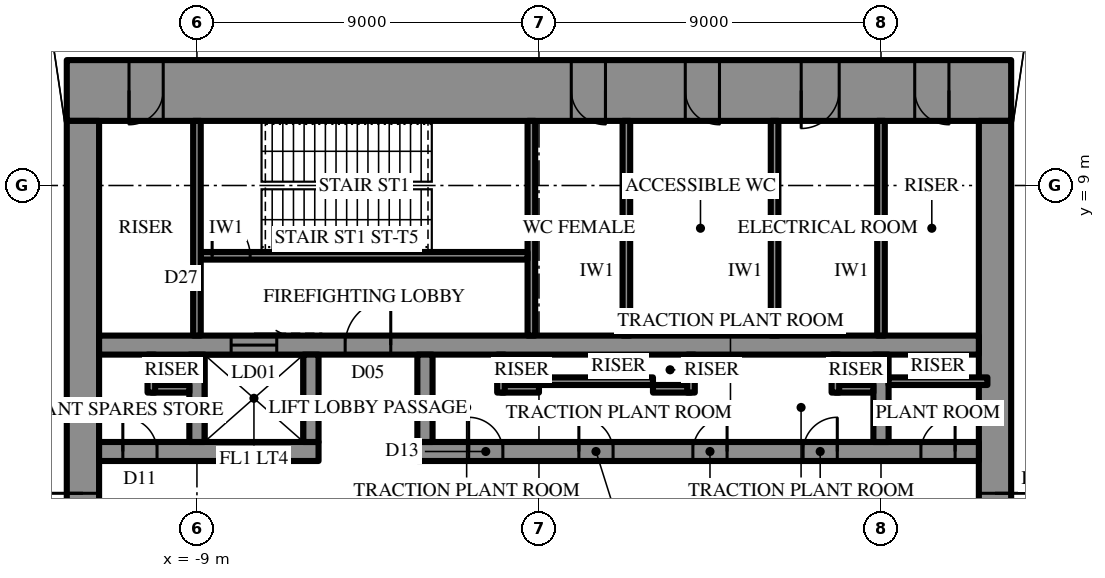
"""IFC4 building model, lengths in metres.
Left out: names, types, materials, properties, quantities, classifications, styles, units other than length and angle.
Written with IfcOpenShell. Run it as: python <this file> out.ifc"""

import sys

from ifc_helpers import new_model, si_unit, direction, frame, frame_2d, origin, place, context, subcontext, project, spatial, rectangle, extrude, element, fill, save


model = new_model("IFC4")
c1 = context("Model", 3, precision=1e-05, world=origin(), true_north=direction((0.0, 1.0)))
c2 = subcontext(c1, "Body", "Model", "MODEL_VIEW")
j1 = project(units=[si_unit("LENGTHUNIT", "METRE"), si_unit("PLANEANGLEUNIT", "RADIAN")], contexts=[c1])
p1 = place(None, origin())
s1 = spatial("IfcSite", under=j1, at=p1, CompositionType="ELEMENT")
p2 = place(p1, origin())
s2 = spatial("IfcBuilding", under=s1, at=p2, CompositionType="ELEMENT")
p3 = place(p2, frame((0.0, 0.0, 396.3)))
s3 = spatial("IfcBuildingStorey", under=s2, at=p3, CompositionType="ELEMENT", Elevation=396.3)
p4 = place(p3, frame((-12.425, 11.5, 0.0), z_axis=(0.0, 0.0, 1.0), x_axis=(1.0, 0.0, 0.0)))
e1 = element("IfcWall", 1, at=p4, inside=s3, PredefinedType="SHEAR", context=c2, shape_type="SweptSolid", body=[
    extrude(rectangle(XDim=24.85, YDim=1.6, at=frame_2d((12.425, 0.0))), origin(), (0.0, 0.0, 1.0), 6.0),
])
p5 = place(p4, frame((13.275, 0.0, 0.0)))
e2 = element("IfcOpeningElement", 2, at=p5, cuts=e1, PredefinedType="OPENING", context=c2, shape_type="SweptSolid", body=[
    extrude(rectangle(XDim=0.9, YDim=2.2, at=frame_2d((0.45, 1.1))), frame((0.0, 0.81, 0.0), z_axis=(0.0, -1.0, 0.0), x_axis=(1.0, 0.0, 0.0)), (0.0, 0.0, 1.0), 1.62),
])
p6 = place(p4, frame((16.275, 0.0, 0.0)))
e3 = element("IfcOpeningElement", 3, at=p6, cuts=e1, PredefinedType="OPENING", context=c2, shape_type="SweptSolid", body=[
    extrude(rectangle(XDim=0.9, YDim=2.2, at=frame_2d((0.45, 1.1))), frame((0.0, 0.81, 0.0), z_axis=(0.0, -1.0, 0.0), x_axis=(1.0, 0.0, 0.0)), (0.0, 0.0, 1.0), 1.62),
])
p7 = place(p4, frame((19.325, 0.0, 0.0)))
e4 = element("IfcOpeningElement", 4, at=p7, cuts=e1, PredefinedType="OPENING", context=c2, shape_type="SweptSolid", body=[
    extrude(rectangle(XDim=1.0, YDim=2.2, at=frame_2d((0.5, 1.1))), frame((0.0, 0.81, 0.0), z_axis=(0.0, -1.0, 0.0), x_axis=(1.0, 0.0, 0.0)), (0.0, 0.0, 1.0), 1.62),
])
p8 = place(p4, frame((1.637, 0.0, 0.0)))
e5 = element("IfcOpeningElement", 5, at=p8, cuts=e1, PredefinedType="OPENING", context=c2, shape_type="SweptSolid", body=[
    extrude(rectangle(XDim=0.9, YDim=2.2, at=frame_2d((0.45, 1.1))), frame((0.0, 0.81, 0.0), z_axis=(0.0, -1.0, 0.0), x_axis=(1.0, 0.0, 0.0)), (0.0, 0.0, 1.0), 1.62),
])
p9 = place(p4, frame((22.312, 0.0, 0.0)))
e6 = element("IfcOpeningElement", 6, at=p9, cuts=e1, PredefinedType="OPENING", context=c2, shape_type="SweptSolid", body=[
    extrude(rectangle(XDim=0.9, YDim=2.2, at=frame_2d((0.45, 1.1))), frame((0.0, 0.81, 0.0), z_axis=(0.0, -1.0, 0.0), x_axis=(1.0, 0.0, 0.0)), (0.0, 0.0, 1.0), 1.62),
])
p10 = place(p3, frame((12.0, -10.7, 0.0), z_axis=(0.0, 0.0, 1.0), x_axis=(0.0, 1.0, 0.0)))
e7 = element("IfcWall", 7, at=p10, inside=s3, PredefinedType="SHEAR", context=c2, shape_type="SweptSolid", body=[
    extrude(rectangle(XDim=21.4, YDim=0.85, at=frame_2d((10.7, 0.0))), origin(), (0.0, 0.0, 1.0), 6.0),
])
p11 = place(p10, frame((9.8, 0.0, 0.0)))
e8 = element("IfcOpeningElement", 8, at=p11, cuts=e7, PredefinedType="OPENING", context=c2, shape_type="SweptSolid", body=[
    extrude(rectangle(XDim=1.8, YDim=2.4, at=frame_2d((0.9, 1.2))), frame((0.0, 0.435, 0.0), z_axis=(0.0, -1.0, 0.0), x_axis=(1.0, 0.0, 0.0)), (0.0, 0.0, 1.0), 0.87),
])
p12 = place(p3, frame((-12.0, 10.7, 0.0), z_axis=(0.0, 0.0, 1.0), x_axis=(0.0, -1.0, 0.0)))
e9 = element("IfcWall", 9, at=p12, inside=s3, PredefinedType="SHEAR", context=c2, shape_type="SweptSolid", body=[
    extrude(rectangle(XDim=21.4, YDim=0.85, at=frame_2d((10.7, 0.0))), origin(), (0.0, 0.0, 1.0), 6.0),
])
p13 = place(p12, frame((9.8, 0.0, 0.0)))
e10 = element("IfcOpeningElement", 10, at=p13, cuts=e9, PredefinedType="OPENING", context=c2, shape_type="SweptSolid", body=[
    extrude(rectangle(XDim=1.8, YDim=2.4, at=frame_2d((0.9, 1.2))), frame((0.0, 0.435, 0.0), z_axis=(0.0, -1.0, 0.0), x_axis=(1.0, 0.0, 0.0)), (0.0, 0.0, 1.0), 0.87),
])
p14 = place(p3, frame((-11.575, 2.0, 0.0), z_axis=(0.0, 0.0, 1.0), x_axis=(1.0, 0.0, 0.0)))
e11 = element("IfcWall", 11, at=p14, inside=s3, PredefinedType="SHEAR", context=c2, shape_type="SweptSolid", body=[
    extrude(rectangle(XDim=5.775, YDim=0.5, at=frame_2d((2.887, 0.0))), origin(), (0.0, 0.0, 1.0), 6.0),
])
p15 = place(p14, frame((0.625, 0.0, 0.0)))
e12 = element("IfcOpeningElement", 12, at=p15, cuts=e11, PredefinedType="OPENING", context=c2, shape_type="SweptSolid", body=[
    extrude(rectangle(XDim=0.9, YDim=2.2, at=frame_2d((0.45, 1.1))), frame((0.0, 0.26, 0.0), z_axis=(0.0, -1.0, 0.0), x_axis=(1.0, 0.0, 0.0)), (0.0, 0.0, 1.0), 0.52),
])
p16 = place(p3, frame((-3.2, 2.0, 0.0), z_axis=(0.0, 0.0, 1.0), x_axis=(1.0, 0.0, 0.0)))
e13 = element("IfcWall", 13, at=p16, inside=s3, PredefinedType="SHEAR", context=c2, shape_type="SweptSolid", body=[
    extrude(rectangle(XDim=14.775, YDim=0.5, at=frame_2d((7.387, 0.0))), origin(), (0.0, 0.0, 1.0), 6.0),
])
p17 = place(p16, frame((1.35, 0.0, 0.0)))
e14 = element("IfcOpeningElement", 14, at=p17, cuts=e13, PredefinedType="OPENING", context=c2, shape_type="SweptSolid", body=[
    extrude(rectangle(XDim=0.9, YDim=2.2, at=frame_2d((0.45, 1.1))), frame((0.0, 0.26, 0.0), z_axis=(0.0, -1.0, 0.0), x_axis=(1.0, 0.0, 0.0)), (0.0, 0.0, 1.0), 0.52),
])
p18 = place(p16, frame((4.25, 0.0, 0.0)))
e15 = element("IfcOpeningElement", 15, at=p18, cuts=e13, PredefinedType="OPENING", context=c2, shape_type="SweptSolid", body=[
    extrude(rectangle(XDim=0.9, YDim=2.2, at=frame_2d((0.45, 1.1))), frame((0.0, 0.26, 0.0), z_axis=(0.0, -1.0, 0.0), x_axis=(1.0, 0.0, 0.0)), (0.0, 0.0, 1.0), 0.52),
])
p19 = place(p16, frame((7.25, 0.0, 0.0)))
e16 = element("IfcOpeningElement", 16, at=p19, cuts=e13, PredefinedType="OPENING", context=c2, shape_type="SweptSolid", body=[
    extrude(rectangle(XDim=0.9, YDim=2.2, at=frame_2d((0.45, 1.1))), frame((0.0, 0.26, 0.0), z_axis=(0.0, -1.0, 0.0), x_axis=(1.0, 0.0, 0.0)), (0.0, 0.0, 1.0), 0.52),
])
p20 = place(p16, frame((10.15, 0.0, 0.0)))
e17 = element("IfcOpeningElement", 17, at=p20, cuts=e13, PredefinedType="OPENING", context=c2, shape_type="SweptSolid", body=[
    extrude(rectangle(XDim=0.9, YDim=2.2, at=frame_2d((0.45, 1.1))), frame((0.0, 0.26, 0.0), z_axis=(0.0, -1.0, 0.0), x_axis=(1.0, 0.0, 0.0)), (0.0, 0.0, 1.0), 0.52),
])
p21 = place(p16, frame((13.25, 0.0, 0.0)))
e18 = element("IfcOpeningElement", 18, at=p21, cuts=e13, PredefinedType="OPENING", context=c2, shape_type="SweptSolid", body=[
    extrude(rectangle(XDim=0.9, YDim=2.2, at=frame_2d((0.45, 1.1))), frame((0.0, 0.26, 0.0), z_axis=(0.0, -1.0, 0.0), x_axis=(1.0, 0.0, 0.0)), (0.0, 0.0, 1.0), 0.52),
])
p22 = place(p3, frame((-11.575, 4.8, 0.0), z_axis=(0.0, 0.0, 1.0), x_axis=(1.0, 0.0, 0.0)))
e19 = element("IfcWall", 19, at=p22, inside=s3, PredefinedType="SHEAR", context=c2, shape_type="SweptSolid", body=[
    extrude(rectangle(XDim=23.15, YDim=0.5, at=frame_2d((11.575, 0.0))), origin(), (0.0, 0.0, 1.0), 6.0),
])
p23 = place(p22, frame((6.475, 0.0, 0.0)))
e20 = element("IfcOpeningElement", 20, at=p23, cuts=e19, PredefinedType="OPENING", context=c2, shape_type="SweptSolid", body=[
    extrude(rectangle(XDim=1.2, YDim=2.2, at=frame_2d((0.6, 1.1))), frame((0.0, 0.26, 0.0), z_axis=(0.0, -1.0, 0.0), x_axis=(1.0, 0.0, 0.0)), (0.0, 0.0, 1.0), 0.52),
])
p24 = place(p22, frame((3.475, 0.0, 0.0)))
e21 = element("IfcOpeningElement", 21, at=p24, cuts=e19, PredefinedType="OPENING", context=c2, shape_type="SweptSolid", body=[
    extrude(rectangle(XDim=1.2, YDim=2.2, at=frame_2d((0.6, 1.1))), frame((0.0, 0.26, 0.0), z_axis=(0.0, -1.0, 0.0), x_axis=(1.0, 0.0, 0.0)), (0.0, 0.0, 1.0), 0.52),
])
for number, where, z_axis, x_axis in (
    (22, (-9.0, 2.25, 0.0), (0.0, 0.0, 1.0), (0.0, 1.0, 0.0)),
    (23, (-6.0, 2.25, 0.0), (0.0, 0.0, 1.0), (0.0, 1.0, 0.0)),
    (24, (-3.0, 2.25, 0.0), (0.0, 0.0, 1.0), (0.0, 1.0, 0.0)),
    (25, (9.0, 2.25, 0.0), (0.0, 0.0, 1.0), (0.0, 1.0, 0.0)),
):
    element("IfcWall", number, at=place(p3, frame(where, z_axis=z_axis, x_axis=x_axis)), inside=s3, PredefinedType="SHEAR", context=c2, shape_type="SweptSolid", body=[
        extrude(rectangle(XDim=2.3, YDim=0.4, at=frame_2d((1.15, 0.0))), origin(), (0.0, 0.0, 1.0), 6.0),
    ])
p25 = place(p3, frame((-0.2, 5.05, 0.0), z_axis=(0.0, 0.0, 1.0), x_axis=(0.0, 1.0, 0.0)))
e26 = element("IfcWall", 26, at=p25, inside=s3, PredefinedType="SHEAR", context=c2, shape_type="SweptSolid", body=[
    extrude(rectangle(XDim=5.65, YDim=0.2, at=frame_2d((2.825, 0.0))), origin(), (0.0, 0.0, 1.0), 6.0),
])
p26 = place(p3, frame((-8.9, 7.15, 0.0), z_axis=(0.0, 0.0, 1.0), x_axis=(1.0, 0.0, 0.0)))
e27 = element("IfcWall", 27, at=p26, inside=s3, PredefinedType="SHEAR", context=c2, shape_type="SweptSolid", body=[
    extrude(rectangle(XDim=8.6, YDim=0.2, at=frame_2d((4.3, 0.0))), origin(), (0.0, 0.0, 1.0), 6.0),
])
p27 = place(p26, frame((0.3, 0.0, 0.0)))
e28 = element("IfcOpeningElement", 28, at=p27, cuts=e27, PredefinedType="OPENING", context=c2, shape_type="SweptSolid", body=[
    extrude(rectangle(XDim=1.0, YDim=2.2, at=frame_2d((0.5, 1.1))), frame((0.0, 0.11, 0.0), z_axis=(0.0, -1.0, 0.0), x_axis=(1.0, 0.0, 0.0)), (0.0, 0.0, 1.0), 0.22),
])
for number, where, z_axis, x_axis in (
    (29, (-9.0, 5.05, 0.0), (0.0, 0.0, 1.0), (0.0, 1.0, 0.0)),
    (30, (9.0, 5.05, 0.0), (0.0, 0.0, 1.0), (0.0, 1.0, 0.0)),
    (31, (2.3, 5.05, 0.0), (0.0, 0.0, 1.0), (0.0, 1.0, 0.0)),
    (32, (6.2, 5.05, 0.0), (0.0, 0.0, 1.0), (0.0, 1.0, 0.0)),
):
    element("IfcWall", number, at=place(p3, frame(where, z_axis=z_axis, x_axis=x_axis)), inside=s3, PredefinedType="PARTITIONING", context=c2, shape_type="SweptSolid", body=[
        extrude(rectangle(XDim=5.65, YDim=0.2, at=frame_2d((2.825, 0.0))), origin(), (0.0, 0.0, 1.0), 5.8),
    ])
for number, where, z_axis, x_axis in (
    (33, (-10.2, 3.65, 0.0), (0.0, 0.0, 1.0), (1.0, 0.0, 0.0)),
    (34, (-10.2, 3.55, 0.0), (0.0, 0.0, 1.0), (0.0, 1.0, 0.0)),
    (35, (-1.0, 3.65, 0.0), (0.0, 0.0, 1.0), (1.0, 0.0, 0.0)),
    (36, (-1.0, 3.55, 0.0), (0.0, 0.0, 1.0), (0.0, 1.0, 0.0)),
):
    element("IfcWall", number, at=place(p3, frame(where, z_axis=z_axis, x_axis=x_axis)), inside=s3, PredefinedType="PARTITIONING", context=c2, shape_type="SweptSolid", body=[
        extrude(rectangle(XDim=1.0, YDim=0.2, at=frame_2d((0.5, 0.0))), origin(), (0.0, 0.0, 1.0), 5.8),
    ])
p28 = place(p3, frame((0.0, 3.85, 0.0), z_axis=(0.0, 0.0, 1.0), x_axis=(1.0, 0.0, 0.0)))
e37 = element("IfcWall", 37, at=p28, inside=s3, PredefinedType="PARTITIONING", context=c2, shape_type="SweptSolid", body=[
    extrude(rectangle(XDim=3.0, YDim=0.2, at=frame_2d((1.5, 0.0))), origin(), (0.0, 0.0, 1.0), 5.8),
])
for number, where, z_axis, x_axis in (
    (38, (3.0, 3.65, 0.0), (0.0, 0.0, 1.0), (1.0, 0.0, 0.0)),
    (39, (4.0, 3.55, 0.0), (0.0, 0.0, 1.0), (0.0, 1.0, 0.0)),
    (40, (7.8, 3.65, 0.0), (0.0, 0.0, 1.0), (1.0, 0.0, 0.0)),
    (41, (7.8, 3.55, 0.0), (0.0, 0.0, 1.0), (0.0, 1.0, 0.0)),
):
    element("IfcWall", number, at=place(p3, frame(where, z_axis=z_axis, x_axis=x_axis)), inside=s3, PredefinedType="PARTITIONING", context=c2, shape_type="SweptSolid", body=[
        extrude(rectangle(XDim=1.0, YDim=0.2, at=frame_2d((0.5, 0.0))), origin(), (0.0, 0.0, 1.0), 5.8),
    ])
p29 = place(p3, frame((9.2, 3.85, 0.0), z_axis=(0.0, 0.0, 1.0), x_axis=(1.0, 0.0, 0.0)))
e42 = element("IfcWall", 42, at=p29, inside=s3, PredefinedType="PARTITIONING", context=c2, shape_type="SweptSolid", body=[
    extrude(rectangle(XDim=2.6, YDim=0.2, at=frame_2d((1.3, 0.0))), origin(), (0.0, 0.0, 1.0), 5.8),
])
p30 = place(p11, frame((1.8, 0.0, 0.0), z_axis=(0.0, 0.0, 1.0), x_axis=(-1.0, 0.0, 0.0)))
e43 = element("IfcDoor", 43, at=p30, inside=s3, OperationType="DOUBLE_DOOR_SINGLE_SWING", PredefinedType="DOOR", context=c2, shape_type="SweptSolid", body=[
    extrude(rectangle(XDim=1.8, YDim=2.4, at=frame_2d((0.9, 1.2))), frame((0.0, 0.025, 0.0), z_axis=(0.0, -1.0, 0.0), x_axis=(1.0, 0.0, 0.0)), (0.0, 0.0, 1.0), 0.05),
])
fill(e8, e43)
p31 = place(p13, frame((1.8, 0.0, 0.0), z_axis=(0.0, 0.0, 1.0), x_axis=(-1.0, 0.0, 0.0)))
e44 = element("IfcDoor", 44, at=p31, inside=s3, OperationType="DOUBLE_DOOR_SINGLE_SWING", PredefinedType="DOOR", context=c2, shape_type="SweptSolid", body=[
    extrude(rectangle(XDim=1.8, YDim=2.4, at=frame_2d((0.9, 1.2))), frame((0.0, 0.025, 0.0), z_axis=(0.0, -1.0, 0.0), x_axis=(1.0, 0.0, 0.0)), (0.0, 0.0, 1.0), 0.05),
])
fill(e10, e44)
p32 = place(p23, origin())
e45 = element("IfcDoor", 45, at=p32, inside=s3, OperationType="SINGLE_SWING_LEFT", PredefinedType="DOOR", context=c2, shape_type="SweptSolid", body=[
    extrude(rectangle(XDim=1.2, YDim=2.2, at=frame_2d((0.6, 1.1))), frame((0.0, 0.025, 0.0), z_axis=(0.0, -1.0, 0.0), x_axis=(1.0, 0.0, 0.0)), (0.0, 0.0, 1.0), 0.05),
])
fill(e20, e45)
p33 = place(p27, origin())
e46 = element("IfcDoor", 46, at=p33, inside=s3, OperationType="SINGLE_SWING_RIGHT", PredefinedType="DOOR", context=c2, shape_type="SweptSolid", body=[
    extrude(rectangle(XDim=1.0, YDim=2.2, at=frame_2d((0.5, 1.1))), frame((0.0, 0.025, 0.0), z_axis=(0.0, -1.0, 0.0), x_axis=(1.0, 0.0, 0.0)), (0.0, 0.0, 1.0), 0.05),
])
fill(e28, e46)
p34 = place(p5, frame((0.9, 0.0, 0.0), z_axis=(0.0, 0.0, 1.0), x_axis=(-1.0, 0.0, 0.0)))
e47 = element("IfcDoor", 47, at=p34, inside=s3, OperationType="SINGLE_SWING_RIGHT", PredefinedType="DOOR", context=c2, shape_type="SweptSolid", body=[
    extrude(rectangle(XDim=0.9, YDim=2.2, at=frame_2d((0.45, 1.1))), frame((0.0, 0.025, 0.0), z_axis=(0.0, -1.0, 0.0), x_axis=(1.0, 0.0, 0.0)), (0.0, 0.0, 1.0), 0.05),
])
fill(e2, e47)
p35 = place(p6, frame((0.9, 0.0, 0.0), z_axis=(0.0, 0.0, 1.0), x_axis=(-1.0, 0.0, 0.0)))
e48 = element("IfcDoor", 48, at=p35, inside=s3, OperationType="SINGLE_SWING_RIGHT", PredefinedType="DOOR", context=c2, shape_type="SweptSolid", body=[
    extrude(rectangle(XDim=0.9, YDim=2.2, at=frame_2d((0.45, 1.1))), frame((0.0, 0.025, 0.0), z_axis=(0.0, -1.0, 0.0), x_axis=(1.0, 0.0, 0.0)), (0.0, 0.0, 1.0), 0.05),
])
fill(e3, e48)
p36 = place(p7, frame((1.0, 0.0, 0.0), z_axis=(0.0, 0.0, 1.0), x_axis=(-1.0, 0.0, 0.0)))
e49 = element("IfcDoor", 49, at=p36, inside=s3, OperationType="SINGLE_SWING_LEFT", PredefinedType="DOOR", context=c2, shape_type="SweptSolid", body=[
    extrude(rectangle(XDim=1.0, YDim=2.2, at=frame_2d((0.5, 1.1))), frame((0.0, 0.025, 0.0), z_axis=(0.0, -1.0, 0.0), x_axis=(1.0, 0.0, 0.0)), (0.0, 0.0, 1.0), 0.05),
])
fill(e4, e49)
p37 = place(p8, frame((0.9, 0.0, 0.0), z_axis=(0.0, 0.0, 1.0), x_axis=(-1.0, 0.0, 0.0)))
e50 = element("IfcDoor", 50, at=p37, inside=s3, OperationType="SINGLE_SWING_LEFT", PredefinedType="DOOR", context=c2, shape_type="SweptSolid", body=[
    extrude(rectangle(XDim=0.9, YDim=2.2, at=frame_2d((0.45, 1.1))), frame((0.0, 0.025, 0.0), z_axis=(0.0, -1.0, 0.0), x_axis=(1.0, 0.0, 0.0)), (0.0, 0.0, 1.0), 0.05),
])
fill(e5, e50)
p38 = place(p9, frame((0.9, 0.0, 0.0), z_axis=(0.0, 0.0, 1.0), x_axis=(-1.0, 0.0, 0.0)))
e51 = element("IfcDoor", 51, at=p38, inside=s3, OperationType="SINGLE_SWING_RIGHT", PredefinedType="DOOR", context=c2, shape_type="SweptSolid", body=[
    extrude(rectangle(XDim=0.9, YDim=2.2, at=frame_2d((0.45, 1.1))), frame((0.0, 0.025, 0.0), z_axis=(0.0, -1.0, 0.0), x_axis=(1.0, 0.0, 0.0)), (0.0, 0.0, 1.0), 0.05),
])
fill(e6, e51)
p39 = place(p15, origin())
e52 = element("IfcDoor", 52, at=p39, inside=s3, OperationType="SINGLE_SWING_RIGHT", PredefinedType="DOOR", context=c2, shape_type="SweptSolid", body=[
    extrude(rectangle(XDim=0.9, YDim=2.2, at=frame_2d((0.45, 1.1))), frame((0.0, 0.025, 0.0), z_axis=(0.0, -1.0, 0.0), x_axis=(1.0, 0.0, 0.0)), (0.0, 0.0, 1.0), 0.05),
])
fill(e12, e52)
p40 = place(p17, origin())
e53 = element("IfcDoor", 53, at=p40, inside=s3, OperationType="SINGLE_SWING_RIGHT", PredefinedType="DOOR", context=c2, shape_type="SweptSolid", body=[
    extrude(rectangle(XDim=0.9, YDim=2.2, at=frame_2d((0.45, 1.1))), frame((0.0, 0.025, 0.0), z_axis=(0.0, -1.0, 0.0), x_axis=(1.0, 0.0, 0.0)), (0.0, 0.0, 1.0), 0.05),
])
fill(e14, e53)
p41 = place(p18, origin())
e54 = element("IfcDoor", 54, at=p41, inside=s3, OperationType="SINGLE_SWING_RIGHT", PredefinedType="DOOR", context=c2, shape_type="SweptSolid", body=[
    extrude(rectangle(XDim=0.9, YDim=2.2, at=frame_2d((0.45, 1.1))), frame((0.0, 0.025, 0.0), z_axis=(0.0, -1.0, 0.0), x_axis=(1.0, 0.0, 0.0)), (0.0, 0.0, 1.0), 0.05),
])
fill(e15, e54)
p42 = place(p19, origin())
e55 = element("IfcDoor", 55, at=p42, inside=s3, OperationType="SINGLE_SWING_LEFT", PredefinedType="DOOR", context=c2, shape_type="SweptSolid", body=[
    extrude(rectangle(XDim=0.9, YDim=2.2, at=frame_2d((0.45, 1.1))), frame((0.0, 0.025, 0.0), z_axis=(0.0, -1.0, 0.0), x_axis=(1.0, 0.0, 0.0)), (0.0, 0.0, 1.0), 0.05),
])
fill(e16, e55)
p43 = place(p20, origin())
e56 = element("IfcDoor", 56, at=p43, inside=s3, OperationType="SINGLE_SWING_LEFT", PredefinedType="DOOR", context=c2, shape_type="SweptSolid", body=[
    extrude(rectangle(XDim=0.9, YDim=2.2, at=frame_2d((0.45, 1.1))), frame((0.0, 0.025, 0.0), z_axis=(0.0, -1.0, 0.0), x_axis=(1.0, 0.0, 0.0)), (0.0, 0.0, 1.0), 0.05),
])
fill(e17, e56)
p44 = place(p21, origin())
e57 = element("IfcDoor", 57, at=p44, inside=s3, OperationType="SINGLE_SWING_LEFT", PredefinedType="DOOR", context=c2, shape_type="SweptSolid", body=[
    extrude(rectangle(XDim=0.9, YDim=2.2, at=frame_2d((0.45, 1.1))), frame((0.0, 0.025, 0.0), z_axis=(0.0, -1.0, 0.0), x_axis=(1.0, 0.0, 0.0)), (0.0, 0.0, 1.0), 0.05),
])
fill(e18, e57)
p45 = place(p24, origin())
e58 = element("IfcDoor", 58, at=p45, inside=s3, OperationType="SLIDING_TO_LEFT", PredefinedType="DOOR", context=c2, shape_type="SweptSolid", body=[
    extrude(rectangle(XDim=1.2, YDim=2.2, at=frame_2d((0.6, 1.1))), frame((0.0, 0.025, 0.0), z_axis=(0.0, -1.0, 0.0), x_axis=(1.0, 0.0, 0.0)), (0.0, 0.0, 1.0), 0.05),
])
fill(e21, e58)
save(model, sys.argv[1])
